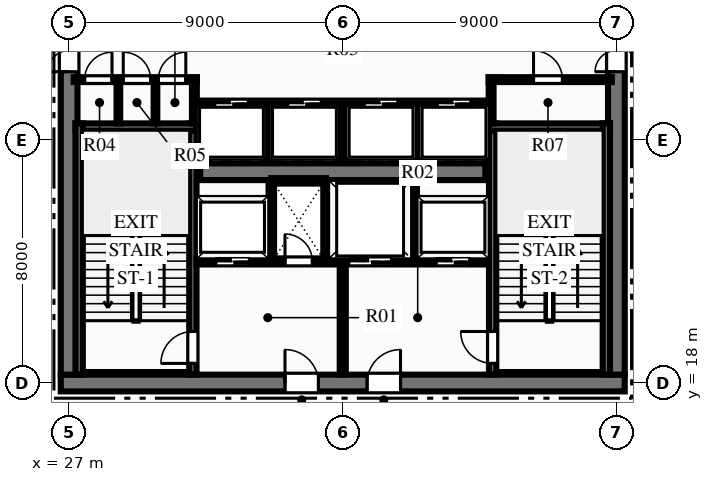
"""IFC4 building model, lengths in metres.
Left out: names, types, materials, properties, quantities, classifications, styles, units other than length and angle.
Written with IfcOpenShell. Run it as: python <this file> out.ifc"""

import sys

from ifc_helpers import new_model, si_unit, direction, frame, frame_2d, origin, place, context, subcontext, project, spatial, rectangle, extrude, element, fill, save


model = new_model("IFC4")
c1 = context("Model", 3, precision=1e-05, world=origin(), true_north=direction((0.0, 1.0)))
c2 = subcontext(c1, "Body", "Model", "MODEL_VIEW")
j1 = project(units=[si_unit("LENGTHUNIT", "METRE"), si_unit("PLANEANGLEUNIT", "RADIAN")], contexts=[c1])
p1 = place(None, origin())
s1 = spatial("IfcSite", under=j1, at=p1, CompositionType="ELEMENT")
p2 = place(p1, origin())
s2 = spatial("IfcBuilding", under=s1, at=p2, CompositionType="ELEMENT")
p3 = place(p2, frame((0.0, 0.0, 97.95)))
s3 = spatial("IfcBuildingStorey", under=s2, at=p3, CompositionType="ELEMENT", Elevation=97.95)
p4 = place(p3, frame((26.725, 18.0, 0.0), z_axis=(0.0, 0.0, 1.0), x_axis=(1.0, 0.0, 0.0)))
e1 = element("IfcWall", 1, at=p4, inside=s3, PredefinedType="SHEAR", context=c2, shape_type="SweptSolid", body=[
    extrude(rectangle(XDim=18.55, YDim=0.55, at=frame_2d((9.275, 0.0))), origin(), (0.0, 0.0, 1.0), 3.75),
])
p5 = place(p4, frame((7.375, 0.0, 0.0)))
e2 = element("IfcOpeningElement", 2, at=p5, cuts=e1, PredefinedType="OPENING", context=c2, shape_type="SweptSolid", body=[
    extrude(rectangle(XDim=1.1, YDim=2.15, at=frame_2d((0.55, 1.075))), frame((0.0, 0.285, 0.0), z_axis=(0.0, -1.0, 0.0), x_axis=(1.0, 0.0, 0.0)), (0.0, 0.0, 1.0), 0.57),
])
p6 = place(p4, frame((10.075, 0.0, 0.0)))
e3 = element("IfcOpeningElement", 3, at=p6, cuts=e1, PredefinedType="OPENING", context=c2, shape_type="SweptSolid", body=[
    extrude(rectangle(XDim=1.1, YDim=2.15, at=frame_2d((0.55, 1.075))), frame((0.0, 0.285, 0.0), z_axis=(0.0, -1.0, 0.0), x_axis=(1.0, 0.0, 0.0)), (0.0, 0.0, 1.0), 0.57),
])
p7 = place(p3, frame((27.0, 18.275, 0.0), z_axis=(0.0, 0.0, 1.0), x_axis=(0.0, 1.0, 0.0)))
e4 = element("IfcWall", 4, at=p7, inside=s3, PredefinedType="SHEAR", context=c2, shape_type="SweptSolid", body=[
    extrude(rectangle(XDim=15.45, YDim=0.55, at=frame_2d((7.725, 0.0))), origin(), (0.0, 0.0, 1.0), 3.75),
])
p8 = place(p7, frame((9.965, 0.0, 0.0)))
e5 = element("IfcOpeningElement", 5, at=p8, cuts=e4, PredefinedType="OPENING", context=c2, shape_type="SweptSolid", body=[
    extrude(rectangle(XDim=1.4, YDim=2.2, at=frame_2d((0.7, 1.1))), frame((0.0, 0.285, 0.0), z_axis=(0.0, -1.0, 0.0), x_axis=(1.0, 0.0, 0.0)), (0.0, 0.0, 1.0), 0.57),
])
p9 = place(p3, frame((45.0, 18.275, 0.0), z_axis=(0.0, 0.0, 1.0), x_axis=(0.0, 1.0, 0.0)))
e6 = element("IfcWall", 6, at=p9, inside=s3, PredefinedType="SHEAR", context=c2, shape_type="SweptSolid", body=[
    extrude(rectangle(XDim=15.45, YDim=0.55, at=frame_2d((7.725, 0.0))), origin(), (0.0, 0.0, 1.0), 3.75),
])
p10 = place(p9, frame((9.965, 0.0, 0.0)))
e7 = element("IfcOpeningElement", 7, at=p10, cuts=e6, PredefinedType="OPENING", context=c2, shape_type="SweptSolid", body=[
    extrude(rectangle(XDim=1.4, YDim=2.2, at=frame_2d((0.7, 1.1))), frame((0.0, 0.285, 0.0), z_axis=(0.0, -1.0, 0.0), x_axis=(1.0, 0.0, 0.0)), (0.0, 0.0, 1.0), 0.57),
])
p11 = place(p3, frame((31.31, 24.95, 0.0), z_axis=(0.0, 0.0, 1.0), x_axis=(1.0, 0.0, 0.0)))
e8 = element("IfcWall", 8, at=p11, inside=s3, PredefinedType="SHEAR", context=c2, shape_type="SweptSolid", body=[
    extrude(rectangle(XDim=9.38, YDim=0.55, at=frame_2d((4.69, 0.0))), origin(), (0.0, 0.0, 1.0), 3.75),
])
p12 = place(p3, frame((31.07, 18.28, 0.0), z_axis=(0.0, 0.0, 1.0), x_axis=(0.0, 1.0, 0.0)))
e9 = element("IfcWall", 9, at=p12, inside=s3, PredefinedType="SHEAR", context=c2, shape_type="SweptSolid", body=[
    extrude(rectangle(XDim=8.26, YDim=0.24, at=frame_2d((4.13, 0.0))), origin(), (0.0, 0.0, 1.0), 3.75),
])
p13 = place(p12, frame((0.365, 0.0, 0.0)))
e10 = element("IfcOpeningElement", 10, at=p13, cuts=e9, PredefinedType="OPENING", context=c2, shape_type="SweptSolid", body=[
    extrude(rectangle(XDim=1.05, YDim=2.15, at=frame_2d((0.525, 1.075))), frame((0.0, 0.13, 0.0), z_axis=(0.0, -1.0, 0.0), x_axis=(1.0, 0.0, 0.0)), (0.0, 0.0, 1.0), 0.26),
])
p14 = place(p3, frame((27.21, 26.42, 0.0), z_axis=(0.0, 0.0, 1.0), x_axis=(1.0, 0.0, 0.0)))
e11 = element("IfcWall", 11, at=p14, inside=s3, PredefinedType="SHEAR", context=c2, shape_type="SweptSolid", body=[
    extrude(rectangle(XDim=3.98, YDim=0.24, at=frame_2d((1.99, 0.0))), origin(), (0.0, 0.0, 1.0), 3.75),
])
p15 = place(p3, frame((27.33, 18.28, 0.0), z_axis=(0.0, 0.0, 1.0), x_axis=(0.0, 1.0, 0.0)))
e12 = element("IfcWall", 12, at=p15, inside=s3, PredefinedType="SHEAR", context=c2, shape_type="SweptSolid", body=[
    extrude(rectangle(XDim=8.26, YDim=0.24, at=frame_2d((4.13, 0.0))), origin(), (0.0, 0.0, 1.0), 3.75),
])
p16 = place(p3, frame((40.93, 18.28, 0.0), z_axis=(0.0, 0.0, 1.0), x_axis=(0.0, 1.0, 0.0)))
e13 = element("IfcWall", 13, at=p16, inside=s3, PredefinedType="SHEAR", context=c2, shape_type="SweptSolid", body=[
    extrude(rectangle(XDim=8.26, YDim=0.24, at=frame_2d((4.13, 0.0))), origin(), (0.0, 0.0, 1.0), 3.75),
])
p17 = place(p16, frame((0.365, 0.0, 0.0)))
e14 = element("IfcOpeningElement", 14, at=p17, cuts=e13, PredefinedType="OPENING", context=c2, shape_type="SweptSolid", body=[
    extrude(rectangle(XDim=1.05, YDim=2.15, at=frame_2d((0.525, 1.075))), frame((0.0, 0.13, 0.0), z_axis=(0.0, -1.0, 0.0), x_axis=(1.0, 0.0, 0.0)), (0.0, 0.0, 1.0), 0.26),
])
p18 = place(p3, frame((40.81, 26.42, 0.0), z_axis=(0.0, 0.0, 1.0), x_axis=(1.0, 0.0, 0.0)))
e15 = element("IfcWall", 15, at=p18, inside=s3, PredefinedType="SHEAR", context=c2, shape_type="SweptSolid", body=[
    extrude(rectangle(XDim=3.98, YDim=0.24, at=frame_2d((1.99, 0.0))), origin(), (0.0, 0.0, 1.0), 3.75),
])
p19 = place(p3, frame((44.67, 18.28, 0.0), z_axis=(0.0, 0.0, 1.0), x_axis=(0.0, 1.0, 0.0)))
e16 = element("IfcWall", 16, at=p19, inside=s3, PredefinedType="SHEAR", context=c2, shape_type="SweptSolid", body=[
    extrude(rectangle(XDim=8.26, YDim=0.24, at=frame_2d((4.13, 0.0))), origin(), (0.0, 0.0, 1.0), 3.75),
])
p20 = place(p3, frame((36.0, 18.28, 0.0), z_axis=(0.0, 0.0, 1.0), x_axis=(0.0, 1.0, 0.0)))
e17 = element("IfcWall", 17, at=p20, inside=s3, PredefinedType="PARTITIONING", context=c2, shape_type="SweptSolid", body=[
    extrude(rectangle(XDim=3.77, YDim=0.2, at=frame_2d((1.885, 0.0))), origin(), (0.0, 0.0, 1.0), 3.45),
])
p21 = place(p3, frame((31.19, 22.0, 0.0), z_axis=(0.0, 0.0, 1.0), x_axis=(1.0, 0.0, 0.0)))
e18 = element("IfcWall", 18, at=p21, inside=s3, PredefinedType="PARTITIONING", context=c2, shape_type="SweptSolid", body=[
    extrude(rectangle(XDim=4.69, YDim=0.2, at=frame_2d((2.345, 0.0))), origin(), (0.0, 0.0, 1.0), 3.45),
])
p22 = place(p21, frame((2.91, 0.0, 0.0)))
e19 = element("IfcOpeningElement", 19, at=p22, cuts=e18, PredefinedType="OPENING", context=c2, shape_type="SweptSolid", body=[
    extrude(rectangle(XDim=0.9, YDim=2.15, at=frame_2d((0.45, 1.075))), frame((0.0, 0.11, 0.0), z_axis=(0.0, -1.0, 0.0), x_axis=(1.0, 0.0, 0.0)), (0.0, 0.0, 1.0), 0.22),
])
p23 = place(p21, frame((0.635, 0.0, 0.0)))
e20 = element("IfcOpeningElement", 20, at=p23, cuts=e18, PredefinedType="OPENING", context=c2, shape_type="SweptSolid", body=[
    extrude(rectangle(XDim=1.1, YDim=2.15, at=frame_2d((0.55, 1.075))), frame((0.0, 0.11, 0.0), z_axis=(0.0, -1.0, 0.0), x_axis=(1.0, 0.0, 0.0)), (0.0, 0.0, 1.0), 0.22),
])
p24 = place(p3, frame((36.12, 22.0, 0.0), z_axis=(0.0, 0.0, 1.0), x_axis=(1.0, 0.0, 0.0)))
e21 = element("IfcWall", 21, at=p24, inside=s3, PredefinedType="PARTITIONING", context=c2, shape_type="SweptSolid", body=[
    extrude(rectangle(XDim=4.69, YDim=0.2, at=frame_2d((2.345, 0.0))), origin(), (0.0, 0.0, 1.0), 3.45),
])
p25 = place(p24, frame((2.955, 0.0, 0.0)))
e22 = element("IfcOpeningElement", 22, at=p25, cuts=e21, PredefinedType="OPENING", context=c2, shape_type="SweptSolid", body=[
    extrude(rectangle(XDim=1.1, YDim=2.15, at=frame_2d((0.55, 1.075))), frame((0.0, 0.11, 0.0), z_axis=(0.0, -1.0, 0.0), x_axis=(1.0, 0.0, 0.0)), (0.0, 0.0, 1.0), 0.22),
])
p26 = place(p24, frame((0.08, 0.0, 0.0)))
e23 = element("IfcOpeningElement", 23, at=p26, cuts=e21, PredefinedType="OPENING", context=c2, shape_type="SweptSolid", body=[
    extrude(rectangle(XDim=1.4, YDim=2.2, at=frame_2d((0.7, 1.1))), frame((0.0, 0.11, 0.0), z_axis=(0.0, -1.0, 0.0), x_axis=(1.0, 0.0, 0.0)), (0.0, 0.0, 1.0), 0.22),
])
for number, where, z_axis, x_axis in (
    (24, (33.65, 22.05, 0.0), (0.0, 0.0, 1.0), (0.0, 1.0, 0.0)),
    (25, (35.45, 22.05, 0.0), (0.0, 0.0, 1.0), (0.0, 1.0, 0.0)),
):
    element("IfcWall", number, at=place(p3, frame(where, z_axis=z_axis, x_axis=x_axis)), inside=s3, PredefinedType="PARTITIONING", context=c2, shape_type="SweptSolid", body=[
        extrude(rectangle(XDim=2.6, YDim=0.18, at=frame_2d((1.3, 0.0))), origin(), (0.0, 0.0, 1.0), 3.45),
    ])
p27 = place(p3, frame((33.65, 24.65, 0.0), z_axis=(0.0, 0.0, 1.0), x_axis=(1.0, 0.0, 0.0)))
e26 = element("IfcWall", 26, at=p27, inside=s3, PredefinedType="PARTITIONING", context=c2, shape_type="SweptSolid", body=[
    extrude(rectangle(XDim=1.8, YDim=0.18, at=frame_2d((0.9, 0.0))), origin(), (0.0, 0.0, 1.0), 3.45),
])
p28 = place(p3, frame((38.35, 22.05, 0.0), z_axis=(0.0, 0.0, 1.0), x_axis=(0.0, 1.0, 0.0)))
e27 = element("IfcWall", 27, at=p28, inside=s3, PredefinedType="PARTITIONING", context=c2, shape_type="SweptSolid", body=[
    extrude(rectangle(XDim=2.6, YDim=0.18, at=frame_2d((1.3, 0.0))), origin(), (0.0, 0.0, 1.0), 3.45),
])
p29 = place(p3, frame((27.15, 27.98, 0.0), z_axis=(0.0, 0.0, 1.0), x_axis=(1.0, 0.0, 0.0)))
e28 = element("IfcWall", 28, at=p29, inside=s3, PredefinedType="PARTITIONING", context=c2, shape_type="SweptSolid", body=[
    extrude(rectangle(XDim=4.05, YDim=0.16, at=frame_2d((2.025, 0.0))), origin(), (0.0, 0.0, 1.0), 3.45),
])
p30 = place(p29, frame((0.36, 0.0, 0.0)))
e29 = element("IfcOpeningElement", 29, at=p30, cuts=e28, PredefinedType="OPENING", context=c2, shape_type="SweptSolid", body=[
    extrude(rectangle(XDim=0.9, YDim=2.15, at=frame_2d((0.45, 1.075))), frame((0.0, 0.09, 0.0), z_axis=(0.0, -1.0, 0.0), x_axis=(1.0, 0.0, 0.0)), (0.0, 0.0, 1.0), 0.18),
])
p31 = place(p29, frame((1.63, 0.0, 0.0)))
e30 = element("IfcOpeningElement", 30, at=p31, cuts=e28, PredefinedType="OPENING", context=c2, shape_type="SweptSolid", body=[
    extrude(rectangle(XDim=0.9, YDim=2.15, at=frame_2d((0.45, 1.075))), frame((0.0, 0.09, 0.0), z_axis=(0.0, -1.0, 0.0), x_axis=(1.0, 0.0, 0.0)), (0.0, 0.0, 1.0), 0.18),
])
p32 = place(p29, frame((2.788, 0.0, 0.0)))
e31 = element("IfcOpeningElement", 31, at=p32, cuts=e28, PredefinedType="OPENING", context=c2, shape_type="SweptSolid", body=[
    extrude(rectangle(XDim=0.9, YDim=2.15, at=frame_2d((0.45, 1.075))), frame((0.0, 0.09, 0.0), z_axis=(0.0, -1.0, 0.0), x_axis=(1.0, 0.0, 0.0)), (0.0, 0.0, 1.0), 0.18),
])
p33 = place(p3, frame((31.12, 26.54, 0.0), z_axis=(0.0, 0.0, 1.0), x_axis=(0.0, 1.0, 0.0)))
e32 = element("IfcWall", 32, at=p33, inside=s3, PredefinedType="PARTITIONING", context=c2, shape_type="SweptSolid", body=[
    extrude(rectangle(XDim=1.51, YDim=0.16, at=frame_2d((0.755, 0.0))), origin(), (0.0, 0.0, 1.0), 3.45),
])
p34 = place(p3, frame((40.8, 27.98, 0.0), z_axis=(0.0, 0.0, 1.0), x_axis=(1.0, 0.0, 0.0)))
e33 = element("IfcWall", 33, at=p34, inside=s3, PredefinedType="PARTITIONING", context=c2, shape_type="SweptSolid", body=[
    extrude(rectangle(XDim=4.05, YDim=0.16, at=frame_2d((2.025, 0.0))), origin(), (0.0, 0.0, 1.0), 3.45),
])
p35 = place(p34, frame((1.475, 0.0, 0.0)))
e34 = element("IfcOpeningElement", 34, at=p35, cuts=e33, PredefinedType="OPENING", context=c2, shape_type="SweptSolid", body=[
    extrude(rectangle(XDim=0.95, YDim=2.15, at=frame_2d((0.475, 1.075))), frame((0.0, 0.09, 0.0), z_axis=(0.0, -1.0, 0.0), x_axis=(1.0, 0.0, 0.0)), (0.0, 0.0, 1.0), 0.18),
])
p36 = place(p3, frame((40.88, 26.54, 0.0), z_axis=(0.0, 0.0, 1.0), x_axis=(0.0, 1.0, 0.0)))
e35 = element("IfcWall", 35, at=p36, inside=s3, PredefinedType="PARTITIONING", context=c2, shape_type="SweptSolid", body=[
    extrude(rectangle(XDim=1.51, YDim=0.16, at=frame_2d((0.755, 0.0))), origin(), (0.0, 0.0, 1.0), 3.45),
])
for number, where, z_axis, x_axis in (
    (36, (28.62, 26.54, 0.0), (0.0, 0.0, 1.0), (0.0, 1.0, 0.0)),
    (37, (29.84, 26.54, 0.0), (0.0, 0.0, 1.0), (0.0, 1.0, 0.0)),
):
    element("IfcWall", number, at=place(p3, frame(where, z_axis=z_axis, x_axis=x_axis)), inside=s3, PredefinedType="PARTITIONING", context=c2, shape_type="SweptSolid", body=[
        extrude(rectangle(XDim=1.44, YDim=0.12, at=frame_2d((0.72, 0.0))), origin(), (0.0, 0.0, 1.0), 3.45),
    ])
p37 = place(p3, frame((31.2, 27.2, 0.0), z_axis=(0.0, 0.0, 1.0), x_axis=(1.0, 0.0, 0.0)))
e38 = element("IfcWall", 38, at=p37, inside=s3, PredefinedType="PARTITIONING", context=c2, shape_type="SweptSolid", body=[
    extrude(rectangle(XDim=9.6, YDim=0.18, at=frame_2d((4.8, 0.0))), origin(), (0.0, 0.0, 1.0), 3.45),
])
p38 = place(p37, frame((0.59, 0.0, 0.0)))
e39 = element("IfcOpeningElement", 39, at=p38, cuts=e38, PredefinedType="OPENING", context=c2, shape_type="SweptSolid", body=[
    extrude(rectangle(XDim=1.1, YDim=2.15, at=frame_2d((0.55, 1.075))), frame((0.0, 0.1, 0.0), z_axis=(0.0, -1.0, 0.0), x_axis=(1.0, 0.0, 0.0)), (0.0, 0.0, 1.0), 0.2),
])
p39 = place(p37, frame((2.99, 0.0, 0.0)))
e40 = element("IfcOpeningElement", 40, at=p39, cuts=e38, PredefinedType="OPENING", context=c2, shape_type="SweptSolid", body=[
    extrude(rectangle(XDim=1.1, YDim=2.15, at=frame_2d((0.55, 1.075))), frame((0.0, 0.1, 0.0), z_axis=(0.0, -1.0, 0.0), x_axis=(1.0, 0.0, 0.0)), (0.0, 0.0, 1.0), 0.2),
])
p40 = place(p37, frame((5.51, 0.0, 0.0)))
e41 = element("IfcOpeningElement", 41, at=p40, cuts=e38, PredefinedType="OPENING", context=c2, shape_type="SweptSolid", body=[
    extrude(rectangle(XDim=1.1, YDim=2.15, at=frame_2d((0.55, 1.075))), frame((0.0, 0.1, 0.0), z_axis=(0.0, -1.0, 0.0), x_axis=(1.0, 0.0, 0.0)), (0.0, 0.0, 1.0), 0.2),
])
p41 = place(p37, frame((7.91, 0.0, 0.0)))
e42 = element("IfcOpeningElement", 42, at=p41, cuts=e38, PredefinedType="OPENING", context=c2, shape_type="SweptSolid", body=[
    extrude(rectangle(XDim=1.1, YDim=2.15, at=frame_2d((0.55, 1.075))), frame((0.0, 0.1, 0.0), z_axis=(0.0, -1.0, 0.0), x_axis=(1.0, 0.0, 0.0)), (0.0, 0.0, 1.0), 0.2),
])
for number, where, z_axis, x_axis in (
    (43, (33.54, 25.3, 0.0), (0.0, 0.0, 1.0), (0.0, 1.0, 0.0)),
    (44, (36.0, 25.3, 0.0), (0.0, 0.0, 1.0), (0.0, 1.0, 0.0)),
    (45, (38.46, 25.3, 0.0), (0.0, 0.0, 1.0), (0.0, 1.0, 0.0)),
):
    element("IfcWall", number, at=place(p3, frame(where, z_axis=z_axis, x_axis=x_axis)), inside=s3, PredefinedType="PARTITIONING", context=c2, shape_type="SweptSolid", body=[
        extrude(rectangle(XDim=1.9, YDim=0.18, at=frame_2d((0.95, 0.0))), origin(), (0.0, 0.0, 1.0), 3.45),
    ])
p42 = place(p30, origin())
e46 = element("IfcDoor", 46, at=p42, inside=s3, OperationType="SINGLE_SWING_RIGHT", PredefinedType="DOOR", context=c2, shape_type="SweptSolid", body=[
    extrude(rectangle(XDim=0.9, YDim=2.15, at=frame_2d((0.45, 1.075))), frame((0.0, 0.025, 0.0), z_axis=(0.0, -1.0, 0.0), x_axis=(1.0, 0.0, 0.0)), (0.0, 0.0, 1.0), 0.05),
])
fill(e29, e46)
p43 = place(p31, origin())
e47 = element("IfcDoor", 47, at=p43, inside=s3, OperationType="SINGLE_SWING_LEFT", PredefinedType="DOOR", context=c2, shape_type="SweptSolid", body=[
    extrude(rectangle(XDim=0.9, YDim=2.15, at=frame_2d((0.45, 1.075))), frame((0.0, 0.025, 0.0), z_axis=(0.0, -1.0, 0.0), x_axis=(1.0, 0.0, 0.0)), (0.0, 0.0, 1.0), 0.05),
])
fill(e30, e47)
p44 = place(p32, origin())
e48 = element("IfcDoor", 48, at=p44, inside=s3, OperationType="SINGLE_SWING_RIGHT", PredefinedType="DOOR", context=c2, shape_type="SweptSolid", body=[
    extrude(rectangle(XDim=0.9, YDim=2.15, at=frame_2d((0.45, 1.075))), frame((0.0, 0.025, 0.0), z_axis=(0.0, -1.0, 0.0), x_axis=(1.0, 0.0, 0.0)), (0.0, 0.0, 1.0), 0.05),
])
fill(e31, e48)
p45 = place(p35, origin())
e49 = element("IfcDoor", 49, at=p45, inside=s3, OperationType="SINGLE_SWING_LEFT", PredefinedType="DOOR", context=c2, shape_type="SweptSolid", body=[
    extrude(rectangle(XDim=0.95, YDim=2.15, at=frame_2d((0.475, 1.075))), frame((0.0, 0.025, 0.0), z_axis=(0.0, -1.0, 0.0), x_axis=(1.0, 0.0, 0.0)), (0.0, 0.0, 1.0), 0.05),
])
fill(e34, e49)
p46 = place(p13, origin())
e50 = element("IfcDoor", 50, at=p46, inside=s3, OperationType="SINGLE_SWING_LEFT", PredefinedType="DOOR", context=c2, shape_type="SweptSolid", body=[
    extrude(rectangle(XDim=1.05, YDim=2.15, at=frame_2d((0.525, 1.075))), frame((0.0, 0.025, 0.0), z_axis=(0.0, -1.0, 0.0), x_axis=(1.0, 0.0, 0.0)), (0.0, 0.0, 1.0), 0.05),
])
fill(e10, e50)
p47 = place(p17, origin())
e51 = element("IfcDoor", 51, at=p47, inside=s3, OperationType="SINGLE_SWING_RIGHT", PredefinedType="DOOR", context=c2, shape_type="SweptSolid", body=[
    extrude(rectangle(XDim=1.05, YDim=2.15, at=frame_2d((0.525, 1.075))), frame((0.0, 0.025, 0.0), z_axis=(0.0, -1.0, 0.0), x_axis=(1.0, 0.0, 0.0)), (0.0, 0.0, 1.0), 0.05),
])
fill(e14, e51)
p48 = place(p5, origin())
e52 = element("IfcDoor", 52, at=p48, inside=s3, OperationType="SINGLE_SWING_LEFT", PredefinedType="DOOR", context=c2, shape_type="SweptSolid", body=[
    extrude(rectangle(XDim=1.1, YDim=2.15, at=frame_2d((0.55, 1.075))), frame((0.0, 0.025, 0.0), z_axis=(0.0, -1.0, 0.0), x_axis=(1.0, 0.0, 0.0)), (0.0, 0.0, 1.0), 0.05),
])
fill(e2, e52)
p49 = place(p6, origin())
e53 = element("IfcDoor", 53, at=p49, inside=s3, OperationType="SINGLE_SWING_RIGHT", PredefinedType="DOOR", context=c2, shape_type="SweptSolid", body=[
    extrude(rectangle(XDim=1.1, YDim=2.15, at=frame_2d((0.55, 1.075))), frame((0.0, 0.025, 0.0), z_axis=(0.0, -1.0, 0.0), x_axis=(1.0, 0.0, 0.0)), (0.0, 0.0, 1.0), 0.05),
])
fill(e3, e53)
p50 = place(p22, origin())
e54 = element("IfcDoor", 54, at=p50, inside=s3, OperationType="SINGLE_SWING_LEFT", PredefinedType="DOOR", context=c2, shape_type="SweptSolid", body=[
    extrude(rectangle(XDim=0.9, YDim=2.15, at=frame_2d((0.45, 1.075))), frame((0.0, 0.025, 0.0), z_axis=(0.0, -1.0, 0.0), x_axis=(1.0, 0.0, 0.0)), (0.0, 0.0, 1.0), 0.05),
])
fill(e19, e54)
p51 = place(p8, origin())
e55 = element("IfcDoor", 55, at=p51, inside=s3, OperationType="DOUBLE_DOOR_SINGLE_SWING", PredefinedType="DOOR", context=c2, shape_type="SweptSolid", body=[
    extrude(rectangle(XDim=1.4, YDim=2.2, at=frame_2d((0.7, 1.1))), frame((0.0, 0.025, 0.0), z_axis=(0.0, -1.0, 0.0), x_axis=(1.0, 0.0, 0.0)), (0.0, 0.0, 1.0), 0.05),
])
fill(e5, e55)
p52 = place(p10, origin())
e56 = element("IfcDoor", 56, at=p52, inside=s3, OperationType="DOUBLE_DOOR_SINGLE_SWING", PredefinedType="DOOR", context=c2, shape_type="SweptSolid", body=[
    extrude(rectangle(XDim=1.4, YDim=2.2, at=frame_2d((0.7, 1.1))), frame((0.0, 0.025, 0.0), z_axis=(0.0, -1.0, 0.0), x_axis=(1.0, 0.0, 0.0)), (0.0, 0.0, 1.0), 0.05),
])
fill(e7, e56)
p53 = place(p38, origin())
e57 = element("IfcDoor", 57, at=p53, inside=s3, OperationType="SLIDING_TO_LEFT", PredefinedType="DOOR", context=c2, shape_type="SweptSolid", body=[
    extrude(rectangle(XDim=1.1, YDim=2.15, at=frame_2d((0.55, 1.075))), frame((0.0, 0.025, 0.0), z_axis=(0.0, -1.0, 0.0), x_axis=(1.0, 0.0, 0.0)), (0.0, 0.0, 1.0), 0.05),
])
fill(e39, e57)
p54 = place(p39, origin())
e58 = element("IfcDoor", 58, at=p54, inside=s3, OperationType="SLIDING_TO_LEFT", PredefinedType="DOOR", context=c2, shape_type="SweptSolid", body=[
    extrude(rectangle(XDim=1.1, YDim=2.15, at=frame_2d((0.55, 1.075))), frame((0.0, 0.025, 0.0), z_axis=(0.0, -1.0, 0.0), x_axis=(1.0, 0.0, 0.0)), (0.0, 0.0, 1.0), 0.05),
])
fill(e40, e58)
p55 = place(p40, origin())
e59 = element("IfcDoor", 59, at=p55, inside=s3, OperationType="SLIDING_TO_LEFT", PredefinedType="DOOR", context=c2, shape_type="SweptSolid", body=[
    extrude(rectangle(XDim=1.1, YDim=2.15, at=frame_2d((0.55, 1.075))), frame((0.0, 0.025, 0.0), z_axis=(0.0, -1.0, 0.0), x_axis=(1.0, 0.0, 0.0)), (0.0, 0.0, 1.0), 0.05),
])
fill(e41, e59)
p56 = place(p41, origin())
e60 = element("IfcDoor", 60, at=p56, inside=s3, OperationType="SLIDING_TO_LEFT", PredefinedType="DOOR", context=c2, shape_type="SweptSolid", body=[
    extrude(rectangle(XDim=1.1, YDim=2.15, at=frame_2d((0.55, 1.075))), frame((0.0, 0.025, 0.0), z_axis=(0.0, -1.0, 0.0), x_axis=(1.0, 0.0, 0.0)), (0.0, 0.0, 1.0), 0.05),
])
fill(e42, e60)
p57 = place(p23, origin())
e61 = element("IfcDoor", 61, at=p57, inside=s3, OperationType="SLIDING_TO_LEFT", PredefinedType="DOOR", context=c2, shape_type="SweptSolid", body=[
    extrude(rectangle(XDim=1.1, YDim=2.15, at=frame_2d((0.55, 1.075))), frame((0.0, 0.025, 0.0), z_axis=(0.0, -1.0, 0.0), x_axis=(1.0, 0.0, 0.0)), (0.0, 0.0, 1.0), 0.05),
])
fill(e20, e61)
p58 = place(p25, origin())
e62 = element("IfcDoor", 62, at=p58, inside=s3, OperationType="SLIDING_TO_LEFT", PredefinedType="DOOR", context=c2, shape_type="SweptSolid", body=[
    extrude(rectangle(XDim=1.1, YDim=2.15, at=frame_2d((0.55, 1.075))), frame((0.0, 0.025, 0.0), z_axis=(0.0, -1.0, 0.0), x_axis=(1.0, 0.0, 0.0)), (0.0, 0.0, 1.0), 0.05),
])
fill(e22, e62)
p59 = place(p26, origin())
e63 = element("IfcDoor", 63, at=p59, inside=s3, OperationType="SLIDING_TO_LEFT", PredefinedType="DOOR", context=c2, shape_type="SweptSolid", body=[
    extrude(rectangle(XDim=1.4, YDim=2.2, at=frame_2d((0.7, 1.1))), frame((0.0, 0.025, 0.0), z_axis=(0.0, -1.0, 0.0), x_axis=(1.0, 0.0, 0.0)), (0.0, 0.0, 1.0), 0.05),
])
fill(e23, e63)
save(model, sys.argv[1])
